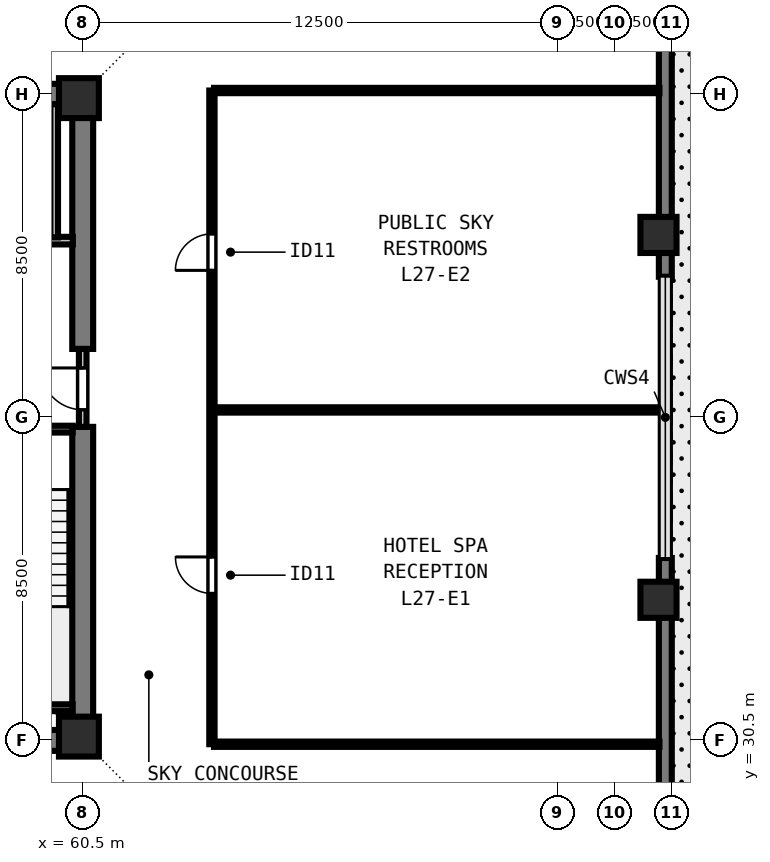
"""IFC4 building model, lengths in metres.
Left out: names, types, materials, properties, quantities, classifications, styles, units other than length and angle.
Written with IfcOpenShell. Run it as: python <this file> out.ifc"""

import sys

from ifc_helpers import new_model, si_unit, direction, frame, frame_2d, origin, origin_2d, place, context, subcontext, project, spatial, rectangle, extrude, element, fill, save


model = new_model("IFC4")
c1 = context("Model", 3, precision=1e-05, world=origin(), true_north=direction((0.0, 1.0)))
c2 = subcontext(c1, "Body", "Model", "MODEL_VIEW")
j1 = project(units=[si_unit("LENGTHUNIT", "METRE"), si_unit("PLANEANGLEUNIT", "RADIAN")], contexts=[c1])
p1 = place(None, origin())
s1 = spatial("IfcSite", under=j1, at=p1, CompositionType="ELEMENT")
p2 = place(p1, origin())
s2 = spatial("IfcBuilding", under=s1, at=p2, CompositionType="ELEMENT")
p3 = place(p2, frame((0.0, 0.0, 101.5)))
s3 = spatial("IfcBuildingStorey", under=s2, at=p3, CompositionType="ELEMENT", Elevation=101.5)
for number, where, z_axis, x_axis in (
    (1, (60.4, 30.6, 0.0), (0.0, 0.0, 1.0), (1.0, 0.0, 0.0)),
    (2, (60.4, 47.4, 0.0), (0.0, 0.0, 1.0), (1.0, 0.0, 0.0)),
):
    element("IfcColumn", number, at=place(p3, frame(where, z_axis=z_axis, x_axis=x_axis)), inside=s3, PredefinedType="COLUMN", context=c2, shape_type="SweptSolid", body=[
        extrude(rectangle(XDim=1.05, YDim=1.05, at=origin_2d()), origin(), (0.0, 0.0, 1.0), 4.5),
    ])
for number, where, z_axis, x_axis in (
    (3, (75.65, 34.2, 0.0), (0.0, 0.0, 1.0), (0.0, 1.0, 0.0)),
    (4, (75.65, 43.8, 0.0), (0.0, 0.0, 1.0), (0.0, 1.0, 0.0)),
):
    element("IfcColumn", number, at=place(p3, frame(where, z_axis=z_axis, x_axis=x_axis)), inside=s3, PredefinedType="COLUMN", context=c2, shape_type="SweptSolid", body=[
        extrude(rectangle(XDim=0.95, YDim=0.95, at=origin_2d()), origin(), (0.0, 0.0, 1.0), 4.5),
    ])
p4 = place(p3, frame((75.83, 59.0, 0.0), z_axis=(0.0, 0.0, 1.0), x_axis=(0.0, -1.0, 0.0)))
e5 = element("IfcWall", 5, at=p4, inside=s3, PredefinedType="SOLIDWALL", context=c2, shape_type="SweptSolid", body=[
    extrude(rectangle(XDim=16.3, YDim=0.34, at=frame_2d((8.15, 0.0))), origin(), (0.0, 0.0, 1.0), 4.28),
])
p5 = place(p3, frame((75.83, 35.3, 0.0), z_axis=(0.0, 0.0, 1.0), x_axis=(0.0, -1.0, 0.0)))
e6 = element("IfcWall", 6, at=p5, inside=s3, PredefinedType="SOLIDWALL", context=c2, shape_type="SweptSolid", body=[
    extrude(rectangle(XDim=15.982, YDim=0.34, at=frame_2d((7.991, 0.0))), origin(), (0.0, 0.0, 1.0), 4.28),
])
for number, where, z_axis, x_axis in (
    (7, (43.225, 30.5, 0.0), (0.0, 0.0, 1.0), (1.0, 0.0, 0.0)),
    (8, (43.225, 47.5, 0.0), (0.0, 0.0, 1.0), (1.0, 0.0, 0.0)),
):
    element("IfcWall", number, at=place(p3, frame(where, z_axis=z_axis, x_axis=x_axis)), inside=s3, PredefinedType="SHEAR", context=c2, shape_type="SweptSolid", body=[
        extrude(rectangle(XDim=17.55, YDim=0.55, at=frame_2d((8.775, 0.0))), origin(), (0.0, 0.0, 1.0), 4.28),
    ])
p6 = place(p3, frame((60.5, 30.765, 0.0), z_axis=(0.0, 0.0, 1.0), x_axis=(0.0, 1.0, 0.0)))
e9 = element("IfcWall", 9, at=p6, inside=s3, PredefinedType="SHEAR", context=c2, shape_type="SweptSolid", body=[
    extrude(rectangle(XDim=7.985, YDim=0.55, at=frame_2d((3.993, 0.0))), origin(), (0.0, 0.0, 1.0), 4.28),
])
p7 = place(p3, frame((60.5, 40.8, 0.0), z_axis=(0.0, 0.0, 1.0), x_axis=(0.0, 1.0, 0.0)))
e10 = element("IfcWall", 10, at=p7, inside=s3, PredefinedType="SHEAR", context=c2, shape_type="SweptSolid", body=[
    extrude(rectangle(XDim=6.435, YDim=0.55, at=frame_2d((3.218, 0.0))), origin(), (0.0, 0.0, 1.0), 4.28),
])
p8 = place(p3, frame((60.5, 38.75, 0.0), z_axis=(0.0, 0.0, 1.0), x_axis=(0.0, 1.0, 0.0)))
e11 = element("IfcWall", 11, at=p8, inside=s3, PredefinedType="SOLIDWALL", context=c2, shape_type="SweptSolid", body=[
    extrude(rectangle(XDim=2.05, YDim=0.2, at=frame_2d((1.025, 0.0))), origin(), (0.0, 0.0, 1.0), 4.28),
])
p9 = place(p8, frame((0.45, 0.0, 0.0)))
e12 = element("IfcOpeningElement", 12, at=p9, cuts=e11, PredefinedType="OPENING", context=c2, shape_type="SweptSolid", body=[
    extrude(rectangle(XDim=1.1, YDim=2.15, at=frame_2d((0.55, 1.075))), frame((0.0, 0.11, 0.0), z_axis=(0.0, -1.0, 0.0), x_axis=(1.0, 0.0, 0.0)), (0.0, 0.0, 1.0), 0.22),
])
p10 = place(p3, frame((56.735, 43.65, 0.0), z_axis=(0.0, 0.0, 1.0), x_axis=(1.0, 0.0, 0.0)))
e13 = element("IfcWall", 13, at=p10, inside=s3, PredefinedType="SOLIDWALL", context=c2, shape_type="SweptSolid", body=[
    extrude(rectangle(XDim=3.505, YDim=0.2, at=frame_2d((1.752, 0.0))), origin(), (0.0, 0.0, 1.0), 4.28),
])
p11 = place(p10, frame((1.295, 0.0, 0.0)))
e14 = element("IfcOpeningElement", 14, at=p11, cuts=e13, PredefinedType="OPENING", context=c2, shape_type="SweptSolid", body=[
    extrude(rectangle(XDim=1.1, YDim=2.2, at=frame_2d((0.55, 1.1))), frame((0.0, 0.11, 0.0), z_axis=(0.0, -1.0, 0.0), x_axis=(1.0, 0.0, 0.0)), (0.0, 0.0, 1.0), 0.22),
])
p12 = place(p3, frame((59.75, 43.735, 0.0), z_axis=(0.0, 0.0, 1.0), x_axis=(0.0, 1.0, 0.0)))
e15 = element("IfcWall", 15, at=p12, inside=s3, PredefinedType="SOLIDWALL", context=c2, shape_type="SweptSolid", body=[
    extrude(rectangle(XDim=3.505, YDim=0.2, at=frame_2d((1.752, 0.0))), origin(), (0.0, 0.0, 1.0), 4.28),
])
p13 = place(p3, frame((63.9, 30.4, 0.0), z_axis=(0.0, 0.0, 1.0), x_axis=(0.0, 1.0, 0.0)))
e16 = element("IfcWall", 16, at=p13, inside=s3, PredefinedType="PARTITIONING", context=c2, shape_type="SweptSolid", body=[
    extrude(rectangle(XDim=17.2, YDim=0.14, at=frame_2d((8.6, 0.0))), origin(), (0.0, 0.0, 1.0), 4.28),
])
p14 = place(p13, frame((3.968, 0.0, 0.0)))
e17 = element("IfcOpeningElement", 17, at=p14, cuts=e16, PredefinedType="OPENING", context=c2, shape_type="SweptSolid", body=[
    extrude(rectangle(XDim=0.96, YDim=2.12, at=frame_2d((0.48, 1.06))), frame((0.0, 0.08, 0.0), z_axis=(0.0, -1.0, 0.0), x_axis=(1.0, 0.0, 0.0)), (0.0, 0.0, 1.0), 0.16),
])
p15 = place(p13, frame((12.468, 0.0, 0.0)))
e18 = element("IfcOpeningElement", 18, at=p15, cuts=e16, PredefinedType="OPENING", context=c2, shape_type="SweptSolid", body=[
    extrude(rectangle(XDim=0.96, YDim=2.12, at=frame_2d((0.48, 1.06))), frame((0.0, 0.08, 0.0), z_axis=(0.0, -1.0, 0.0), x_axis=(1.0, 0.0, 0.0)), (0.0, 0.0, 1.0), 0.16),
])
for number, where, z_axis, x_axis in (
    (19, (63.955, 30.4, 0.0), (0.0, 0.0, 1.0), (1.0, 0.0, 0.0)),
    (20, (63.955, 47.6, 0.0), (0.0, 0.0, 1.0), (1.0, 0.0, 0.0)),
):
    element("IfcWall", number, at=place(p3, frame(where, z_axis=z_axis, x_axis=x_axis)), inside=s3, PredefinedType="PARTITIONING", context=c2, shape_type="SweptSolid", body=[
        extrude(rectangle(XDim=11.72, YDim=0.14, at=frame_2d((5.86, 0.0))), origin(), (0.0, 0.0, 1.0), 4.28),
    ])
p16 = place(p3, frame((64.0, 39.195, 0.0), z_axis=(0.0, 0.0, 1.0), x_axis=(1.0, 0.0, 0.0)))
e21 = element("IfcWall", 21, at=p16, inside=s3, PredefinedType="PARTITIONING", context=c2, shape_type="SweptSolid", body=[
    extrude(rectangle(XDim=11.83, YDim=0.14, at=frame_2d((5.915, 0.0))), origin(), (0.0, 0.0, 1.0), 4.28),
])
p17 = place(p3, frame((57.005, 38.69, 0.0), z_axis=(0.0, 0.0, 1.0), x_axis=(1.0, 0.0, 0.0)))
e22 = element("IfcWall", 22, at=p17, inside=s3, PredefinedType="SOLIDWALL", context=c2, shape_type="SweptSolid", body=[
    extrude(rectangle(XDim=3.23, YDim=0.18, at=frame_2d((1.615, 0.0))), origin(), (0.0, 0.0, 1.0), 4.28),
])
p18 = place(p17, frame((1.14, 0.0, 0.0)))
e23 = element("IfcOpeningElement", 23, at=p18, cuts=e22, PredefinedType="OPENING", context=c2, shape_type="SweptSolid", body=[
    extrude(rectangle(XDim=0.95, YDim=2.15, at=frame_2d((0.475, 1.075))), frame((0.0, 0.1, 0.0), z_axis=(0.0, -1.0, 0.0), x_axis=(1.0, 0.0, 0.0)), (0.0, 0.0, 1.0), 0.2),
])
p19 = place(p3, frame((57.005, 31.36, 0.0), z_axis=(0.0, 0.0, 1.0), x_axis=(1.0, 0.0, 0.0)))
e24 = element("IfcWall", 24, at=p19, inside=s3, PredefinedType="SOLIDWALL", context=c2, shape_type="SweptSolid", body=[
    extrude(rectangle(XDim=3.23, YDim=0.18, at=frame_2d((1.615, 0.0))), origin(), (0.0, 0.0, 1.0), 4.28),
])
p20 = place(p9, origin())
e25 = element("IfcDoor", 25, at=p20, inside=s3, OperationType="SINGLE_SWING_RIGHT", PredefinedType="DOOR", context=c2, shape_type="SweptSolid", body=[
    extrude(rectangle(XDim=1.1, YDim=2.15, at=frame_2d((0.55, 1.075))), frame((0.0, 0.025, 0.0), z_axis=(0.0, -1.0, 0.0), x_axis=(1.0, 0.0, 0.0)), (0.0, 0.0, 1.0), 0.05),
])
fill(e12, e25)
p21 = place(p14, origin())
e26 = element("IfcDoor", 26, at=p21, inside=s3, OperationType="SINGLE_SWING_RIGHT", PredefinedType="DOOR", context=c2, shape_type="SweptSolid", body=[
    extrude(rectangle(XDim=0.96, YDim=2.12, at=frame_2d((0.48, 1.06))), frame((0.0, 0.025, 0.0), z_axis=(0.0, -1.0, 0.0), x_axis=(1.0, 0.0, 0.0)), (0.0, 0.0, 1.0), 0.05),
])
fill(e17, e26)
p22 = place(p15, origin())
e27 = element("IfcDoor", 27, at=p22, inside=s3, OperationType="SINGLE_SWING_LEFT", PredefinedType="DOOR", context=c2, shape_type="SweptSolid", body=[
    extrude(rectangle(XDim=0.96, YDim=2.12, at=frame_2d((0.48, 1.06))), frame((0.0, 0.025, 0.0), z_axis=(0.0, -1.0, 0.0), x_axis=(1.0, 0.0, 0.0)), (0.0, 0.0, 1.0), 0.05),
])
fill(e18, e27)
save(model, sys.argv[1])
